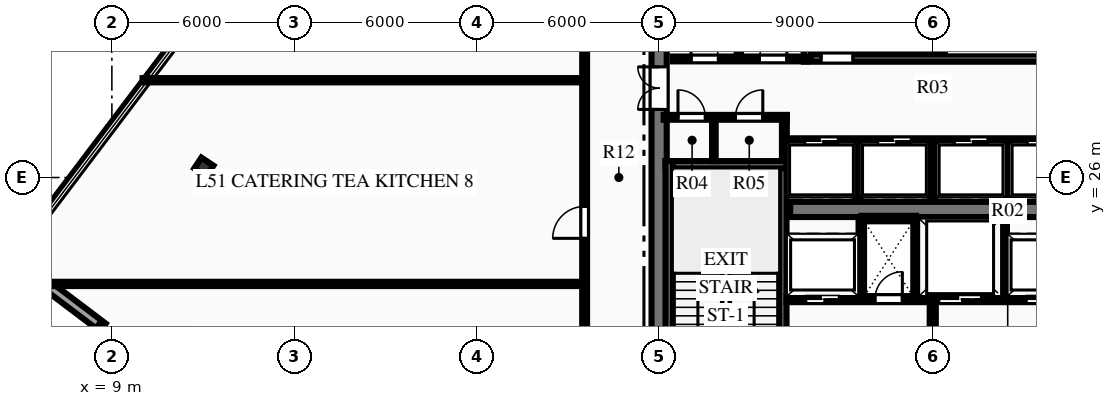
"""IFC4 building model, lengths in metres.
Left out: names, types, materials, properties, quantities, classifications, styles, units other than length and angle.
Written with IfcOpenShell. Run it as: python <this file> out.ifc"""

import sys

from ifc_helpers import new_model, si_unit, direction, frame, frame_2d, origin, origin_2d, place, context, subcontext, project, spatial, rectangle, i_section, extrude, element, fill, save


model = new_model("IFC4")
c1 = context("Model", 3, precision=1e-05, world=origin(), true_north=direction((0.0, 1.0)))
c2 = subcontext(c1, "Body", "Model", "MODEL_VIEW")
j1 = project(units=[si_unit("LENGTHUNIT", "METRE"), si_unit("PLANEANGLEUNIT", "RADIAN")], contexts=[c1])
p1 = place(None, origin())
s1 = spatial("IfcSite", under=j1, at=p1, CompositionType="ELEMENT")
p2 = place(p1, origin())
s2 = spatial("IfcBuilding", under=s1, at=p2, CompositionType="ELEMENT")
p3 = place(p2, frame((0.0, 0.0, 205.95)))
s3 = spatial("IfcBuildingStorey", under=s2, at=p3, CompositionType="ELEMENT", Elevation=205.95)
p4 = place(p3, frame((27.0, 18.25, 0.0), z_axis=(0.0, 0.0, 1.0), x_axis=(0.0, 1.0, 0.0)))
e1 = element("IfcWall", 1, at=p4, inside=s3, PredefinedType="SHEAR", context=c2, shape_type="SweptSolid", body=[
    extrude(rectangle(XDim=15.5, YDim=0.5, at=frame_2d((7.75, 0.0))), origin(), (0.0, 0.0, 1.0), 3.75),
])
p5 = place(p4, frame((9.99, 0.0, 0.0)))
e2 = element("IfcOpeningElement", 2, at=p5, cuts=e1, PredefinedType="OPENING", context=c2, shape_type="SweptSolid", body=[
    extrude(rectangle(XDim=1.4, YDim=2.2, at=frame_2d((0.7, 1.1))), frame((0.0, 0.26, 0.0), z_axis=(0.0, -1.0, 0.0), x_axis=(1.0, 0.0, 0.0)), (0.0, 0.0, 1.0), 0.52),
])
p6 = place(p3, frame((31.31, 24.95, 0.0), z_axis=(0.0, 0.0, 1.0), x_axis=(1.0, 0.0, 0.0)))
e3 = element("IfcWall", 3, at=p6, inside=s3, PredefinedType="SHEAR", context=c2, shape_type="SweptSolid", body=[
    extrude(rectangle(XDim=9.38, YDim=0.5, at=frame_2d((4.69, 0.0))), origin(), (0.0, 0.0, 1.0), 3.75),
])
p7 = place(p3, frame((31.07, 18.28, 0.0), z_axis=(0.0, 0.0, 1.0), x_axis=(0.0, 1.0, 0.0)))
e4 = element("IfcWall", 4, at=p7, inside=s3, PredefinedType="SHEAR", context=c2, shape_type="SweptSolid", body=[
    extrude(rectangle(XDim=8.26, YDim=0.24, at=frame_2d((4.13, 0.0))), origin(), (0.0, 0.0, 1.0), 3.75),
])
p8 = place(p7, frame((0.365, 0.0, 0.0)))
e5 = element("IfcOpeningElement", 5, at=p8, cuts=e4, PredefinedType="OPENING", context=c2, shape_type="SweptSolid", body=[
    extrude(rectangle(XDim=1.05, YDim=2.15, at=frame_2d((0.525, 1.075))), frame((0.0, 0.13, 0.0), z_axis=(0.0, -1.0, 0.0), x_axis=(1.0, 0.0, 0.0)), (0.0, 0.0, 1.0), 0.26),
])
p9 = place(p3, frame((27.21, 26.42, 0.0), z_axis=(0.0, 0.0, 1.0), x_axis=(1.0, 0.0, 0.0)))
e6 = element("IfcWall", 6, at=p9, inside=s3, PredefinedType="SHEAR", context=c2, shape_type="SweptSolid", body=[
    extrude(rectangle(XDim=3.98, YDim=0.24, at=frame_2d((1.99, 0.0))), origin(), (0.0, 0.0, 1.0), 3.75),
])
p10 = place(p3, frame((27.33, 18.28, 0.0), z_axis=(0.0, 0.0, 1.0), x_axis=(0.0, 1.0, 0.0)))
e7 = element("IfcWall", 7, at=p10, inside=s3, PredefinedType="SHEAR", context=c2, shape_type="SweptSolid", body=[
    extrude(rectangle(XDim=8.26, YDim=0.24, at=frame_2d((4.13, 0.0))), origin(), (0.0, 0.0, 1.0), 3.75),
])
p11 = place(p3, frame((31.76, 29.93, 0.0), z_axis=(0.0, 0.0, 1.0), x_axis=(1.0, 0.0, 0.0)))
e8 = element("IfcWall", 8, at=p11, inside=s3, PredefinedType="SHEAR", context=c2, shape_type="SweptSolid", body=[
    extrude(rectangle(XDim=8.38, YDim=0.24, at=frame_2d((4.19, 0.0))), origin(), (0.0, 0.0, 1.0), 3.75),
])
p12 = place(p11, frame((0.565, 0.0, 0.0)))
e9 = element("IfcOpeningElement", 9, at=p12, cuts=e8, PredefinedType="OPENING", context=c2, shape_type="SweptSolid", body=[
    extrude(rectangle(XDim=1.05, YDim=2.15, at=frame_2d((0.525, 1.075))), frame((0.0, 0.13, 0.0), z_axis=(0.0, -1.0, 0.0), x_axis=(1.0, 0.0, 0.0)), (0.0, 0.0, 1.0), 0.26),
])
p13 = place(p3, frame((31.88, 29.93, 0.0), z_axis=(0.0, 0.0, 1.0), x_axis=(0.0, 1.0, 0.0)))
e10 = element("IfcWall", 10, at=p13, inside=s3, PredefinedType="SHEAR", context=c2, shape_type="SweptSolid", body=[
    extrude(rectangle(XDim=3.79, YDim=0.24, at=frame_2d((1.895, 0.0))), origin(), (0.0, 0.0, 1.0), 3.75),
])
p14 = place(p3, frame((12.025, 26.347, 0.0), z_axis=(0.0, 0.0, 1.0), x_axis=(0.554118199338, 0.832437998389, 0.0)))
e11 = element("IfcColumn", 11, at=p14, inside=s3, PredefinedType="COLUMN", context=c2, shape_type="SweptSolid", body=[
    extrude(i_section(OverallWidth=0.424, OverallDepth=0.474, WebThickness=0.048, FlangeThickness=0.077, at=origin_2d()), origin(), (0.0, 0.0, 1.0), 3.75),
])
p15 = place(p3, frame((8.7, 21.07, 0.0), z_axis=(0.0, 0.0, 1.0), x_axis=(-0.797582200659, 0.603210272784, 0.0)))
e12 = element("IfcWall", 12, at=p15, inside=s3, PredefinedType="STANDARD", context=c2, shape_type="SweptSolid", body=[
    extrude(rectangle(XDim=3.9, YDim=0.32, at=frame_2d((1.95, 0.0))), origin(), (0.0, 0.0, 1.0), 3.47),
])
p16 = place(p3, frame((6.347, 17.959, 0.0), z_axis=(0.0, 0.0, 1.0), x_axis=(0.603210272784, 0.797582200659, 0.0)))
e13 = element("IfcWall", 13, at=p16, inside=s3, PredefinedType="STANDARD", context=c2, shape_type="SweptSolid", body=[
    extrude(rectangle(XDim=3.9, YDim=0.32, at=frame_2d((1.95, 0.0))), origin(), (0.0, 0.0, 1.0), 3.47),
])
p17 = place(p16, frame((1.25, 0.0, 0.85)))
e14 = element("IfcOpeningElement", 14, at=p17, cuts=e13, PredefinedType="OPENING", context=c2, shape_type="SweptSolid", body=[
    extrude(rectangle(XDim=1.4, YDim=2.0, at=frame_2d((0.7, 1.0))), frame((0.0, 0.17, 0.0), z_axis=(0.0, -1.0, 0.0), x_axis=(1.0, 0.0, 0.0)), (0.0, 0.0, 1.0), 0.34),
])
p18 = place(p3, frame((36.0, 18.28, 0.0), z_axis=(0.0, 0.0, 1.0), x_axis=(0.0, 1.0, 0.0)))
e15 = element("IfcWall", 15, at=p18, inside=s3, PredefinedType="PARTITIONING", context=c2, shape_type="SweptSolid", body=[
    extrude(rectangle(XDim=3.77, YDim=0.2, at=frame_2d((1.885, 0.0))), origin(), (0.0, 0.0, 1.0), 3.47),
])
p19 = place(p3, frame((31.19, 22.0, 0.0), z_axis=(0.0, 0.0, 1.0), x_axis=(1.0, 0.0, 0.0)))
e16 = element("IfcWall", 16, at=p19, inside=s3, PredefinedType="PARTITIONING", context=c2, shape_type="SweptSolid", body=[
    extrude(rectangle(XDim=4.69, YDim=0.2, at=frame_2d((2.345, 0.0))), origin(), (0.0, 0.0, 1.0), 3.47),
])
p20 = place(p19, frame((2.91, 0.0, 0.0)))
e17 = element("IfcOpeningElement", 17, at=p20, cuts=e16, PredefinedType="OPENING", context=c2, shape_type="SweptSolid", body=[
    extrude(rectangle(XDim=0.9, YDim=2.15, at=frame_2d((0.45, 1.075))), frame((0.0, 0.11, 0.0), z_axis=(0.0, -1.0, 0.0), x_axis=(1.0, 0.0, 0.0)), (0.0, 0.0, 1.0), 0.22),
])
p21 = place(p19, frame((0.635, 0.0, 0.0)))
e18 = element("IfcOpeningElement", 18, at=p21, cuts=e16, PredefinedType="OPENING", context=c2, shape_type="SweptSolid", body=[
    extrude(rectangle(XDim=1.1, YDim=2.15, at=frame_2d((0.55, 1.075))), frame((0.0, 0.11, 0.0), z_axis=(0.0, -1.0, 0.0), x_axis=(1.0, 0.0, 0.0)), (0.0, 0.0, 1.0), 0.22),
])
p22 = place(p3, frame((36.12, 22.0, 0.0), z_axis=(0.0, 0.0, 1.0), x_axis=(1.0, 0.0, 0.0)))
e19 = element("IfcWall", 19, at=p22, inside=s3, PredefinedType="PARTITIONING", context=c2, shape_type="SweptSolid", body=[
    extrude(rectangle(XDim=4.69, YDim=0.2, at=frame_2d((2.345, 0.0))), origin(), (0.0, 0.0, 1.0), 3.47),
])
p23 = place(p22, frame((2.955, 0.0, 0.0)))
e20 = element("IfcOpeningElement", 20, at=p23, cuts=e19, PredefinedType="OPENING", context=c2, shape_type="SweptSolid", body=[
    extrude(rectangle(XDim=1.1, YDim=2.15, at=frame_2d((0.55, 1.075))), frame((0.0, 0.11, 0.0), z_axis=(0.0, -1.0, 0.0), x_axis=(1.0, 0.0, 0.0)), (0.0, 0.0, 1.0), 0.22),
])
p24 = place(p22, frame((0.08, 0.0, 0.0)))
e21 = element("IfcOpeningElement", 21, at=p24, cuts=e19, PredefinedType="OPENING", context=c2, shape_type="SweptSolid", body=[
    extrude(rectangle(XDim=1.4, YDim=2.2, at=frame_2d((0.7, 1.1))), frame((0.0, 0.11, 0.0), z_axis=(0.0, -1.0, 0.0), x_axis=(1.0, 0.0, 0.0)), (0.0, 0.0, 1.0), 0.22),
])
for number, where, z_axis, x_axis in (
    (22, (33.65, 22.05, 0.0), (0.0, 0.0, 1.0), (0.0, 1.0, 0.0)),
    (23, (35.45, 22.05, 0.0), (0.0, 0.0, 1.0), (0.0, 1.0, 0.0)),
):
    element("IfcWall", number, at=place(p3, frame(where, z_axis=z_axis, x_axis=x_axis)), inside=s3, PredefinedType="PARTITIONING", context=c2, shape_type="SweptSolid", body=[
        extrude(rectangle(XDim=2.6, YDim=0.18, at=frame_2d((1.3, 0.0))), origin(), (0.0, 0.0, 1.0), 3.47),
    ])
p25 = place(p3, frame((33.65, 24.65, 0.0), z_axis=(0.0, 0.0, 1.0), x_axis=(1.0, 0.0, 0.0)))
e24 = element("IfcWall", 24, at=p25, inside=s3, PredefinedType="PARTITIONING", context=c2, shape_type="SweptSolid", body=[
    extrude(rectangle(XDim=1.8, YDim=0.18, at=frame_2d((0.9, 0.0))), origin(), (0.0, 0.0, 1.0), 3.47),
])
p26 = place(p3, frame((38.35, 22.05, 0.0), z_axis=(0.0, 0.0, 1.0), x_axis=(0.0, 1.0, 0.0)))
e25 = element("IfcWall", 25, at=p26, inside=s3, PredefinedType="PARTITIONING", context=c2, shape_type="SweptSolid", body=[
    extrude(rectangle(XDim=2.6, YDim=0.18, at=frame_2d((1.3, 0.0))), origin(), (0.0, 0.0, 1.0), 3.47),
])
p27 = place(p3, frame((27.15, 27.98, 0.0), z_axis=(0.0, 0.0, 1.0), x_axis=(1.0, 0.0, 0.0)))
e26 = element("IfcWall", 26, at=p27, inside=s3, PredefinedType="PARTITIONING", context=c2, shape_type="SweptSolid", body=[
    extrude(rectangle(XDim=4.05, YDim=0.16, at=frame_2d((2.025, 0.0))), origin(), (0.0, 0.0, 1.0), 3.47),
])
p28 = place(p27, frame((0.47, 0.0, 0.0)))
e27 = element("IfcOpeningElement", 27, at=p28, cuts=e26, PredefinedType="OPENING", context=c2, shape_type="SweptSolid", body=[
    extrude(rectangle(XDim=0.9, YDim=2.15, at=frame_2d((0.45, 1.075))), frame((0.0, 0.09, 0.0), z_axis=(0.0, -1.0, 0.0), x_axis=(1.0, 0.0, 0.0)), (0.0, 0.0, 1.0), 0.18),
])
p29 = place(p27, frame((2.36, 0.0, 0.0)))
e28 = element("IfcOpeningElement", 28, at=p29, cuts=e26, PredefinedType="OPENING", context=c2, shape_type="SweptSolid", body=[
    extrude(rectangle(XDim=0.9, YDim=2.15, at=frame_2d((0.45, 1.075))), frame((0.0, 0.09, 0.0), z_axis=(0.0, -1.0, 0.0), x_axis=(1.0, 0.0, 0.0)), (0.0, 0.0, 1.0), 0.18),
])
p30 = place(p3, frame((31.12, 26.54, 0.0), z_axis=(0.0, 0.0, 1.0), x_axis=(0.0, 1.0, 0.0)))
e29 = element("IfcWall", 29, at=p30, inside=s3, PredefinedType="PARTITIONING", context=c2, shape_type="SweptSolid", body=[
    extrude(rectangle(XDim=1.51, YDim=0.16, at=frame_2d((0.755, 0.0))), origin(), (0.0, 0.0, 1.0), 3.47),
])
p31 = place(p3, frame((28.8, 26.54, 0.0), z_axis=(0.0, 0.0, 1.0), x_axis=(0.0, 1.0, 0.0)))
e30 = element("IfcWall", 30, at=p31, inside=s3, PredefinedType="PARTITIONING", context=c2, shape_type="SweptSolid", body=[
    extrude(rectangle(XDim=1.44, YDim=0.12, at=frame_2d((0.72, 0.0))), origin(), (0.0, 0.0, 1.0), 3.47),
])
p32 = place(p3, frame((27.45, 29.9, 0.0), z_axis=(0.0, 0.0, 1.0), x_axis=(1.0, 0.0, 0.0)))
e31 = element("IfcWall", 31, at=p32, inside=s3, PredefinedType="PARTITIONING", context=c2, shape_type="SweptSolid", body=[
    extrude(rectangle(XDim=4.43, YDim=0.16, at=frame_2d((2.215, 0.0))), origin(), (0.0, 0.0, 1.0), 3.47),
])
p33 = place(p32, frame((0.6, 0.0, 0.0)))
e32 = element("IfcOpeningElement", 32, at=p33, cuts=e31, PredefinedType="OPENING", context=c2, shape_type="SweptSolid", body=[
    extrude(rectangle(XDim=0.9, YDim=2.15, at=frame_2d((0.45, 1.075))), frame((0.0, 0.09, 0.0), z_axis=(0.0, -1.0, 0.0), x_axis=(1.0, 0.0, 0.0)), (0.0, 0.0, 1.0), 0.18),
])
p34 = place(p32, frame((2.85, 0.0, 0.0)))
e33 = element("IfcOpeningElement", 33, at=p34, cuts=e31, PredefinedType="OPENING", context=c2, shape_type="SweptSolid", body=[
    extrude(rectangle(XDim=0.9, YDim=2.15, at=frame_2d((0.45, 1.075))), frame((0.0, 0.09, 0.0), z_axis=(0.0, -1.0, 0.0), x_axis=(1.0, 0.0, 0.0)), (0.0, 0.0, 1.0), 0.18),
])
p35 = place(p3, frame((29.62, 29.95, 0.0), z_axis=(0.0, 0.0, 1.0), x_axis=(0.0, 1.0, 0.0)))
e34 = element("IfcWall", 34, at=p35, inside=s3, PredefinedType="PARTITIONING", context=c2, shape_type="SweptSolid", body=[
    extrude(rectangle(XDim=3.6, YDim=0.14, at=frame_2d((1.8, 0.0))), origin(), (0.0, 0.0, 1.0), 3.47),
])
p36 = place(p3, frame((31.2, 27.2, 0.0), z_axis=(0.0, 0.0, 1.0), x_axis=(1.0, 0.0, 0.0)))
e35 = element("IfcWall", 35, at=p36, inside=s3, PredefinedType="PARTITIONING", context=c2, shape_type="SweptSolid", body=[
    extrude(rectangle(XDim=9.6, YDim=0.18, at=frame_2d((4.8, 0.0))), origin(), (0.0, 0.0, 1.0), 3.47),
])
p37 = place(p36, frame((0.59, 0.0, 0.0)))
e36 = element("IfcOpeningElement", 36, at=p37, cuts=e35, PredefinedType="OPENING", context=c2, shape_type="SweptSolid", body=[
    extrude(rectangle(XDim=1.1, YDim=2.15, at=frame_2d((0.55, 1.075))), frame((0.0, 0.1, 0.0), z_axis=(0.0, -1.0, 0.0), x_axis=(1.0, 0.0, 0.0)), (0.0, 0.0, 1.0), 0.2),
])
p38 = place(p36, frame((2.99, 0.0, 0.0)))
e37 = element("IfcOpeningElement", 37, at=p38, cuts=e35, PredefinedType="OPENING", context=c2, shape_type="SweptSolid", body=[
    extrude(rectangle(XDim=1.1, YDim=2.15, at=frame_2d((0.55, 1.075))), frame((0.0, 0.1, 0.0), z_axis=(0.0, -1.0, 0.0), x_axis=(1.0, 0.0, 0.0)), (0.0, 0.0, 1.0), 0.2),
])
p39 = place(p36, frame((5.51, 0.0, 0.0)))
e38 = element("IfcOpeningElement", 38, at=p39, cuts=e35, PredefinedType="OPENING", context=c2, shape_type="SweptSolid", body=[
    extrude(rectangle(XDim=1.1, YDim=2.15, at=frame_2d((0.55, 1.075))), frame((0.0, 0.1, 0.0), z_axis=(0.0, -1.0, 0.0), x_axis=(1.0, 0.0, 0.0)), (0.0, 0.0, 1.0), 0.2),
])
p40 = place(p36, frame((7.91, 0.0, 0.0)))
e39 = element("IfcOpeningElement", 39, at=p40, cuts=e35, PredefinedType="OPENING", context=c2, shape_type="SweptSolid", body=[
    extrude(rectangle(XDim=1.1, YDim=2.15, at=frame_2d((0.55, 1.075))), frame((0.0, 0.1, 0.0), z_axis=(0.0, -1.0, 0.0), x_axis=(1.0, 0.0, 0.0)), (0.0, 0.0, 1.0), 0.2),
])
for number, where, z_axis, x_axis in (
    (40, (33.54, 25.3, 0.0), (0.0, 0.0, 1.0), (0.0, 1.0, 0.0)),
    (41, (36.0, 25.3, 0.0), (0.0, 0.0, 1.0), (0.0, 1.0, 0.0)),
    (42, (38.46, 25.3, 0.0), (0.0, 0.0, 1.0), (0.0, 1.0, 0.0)),
):
    element("IfcWall", number, at=place(p3, frame(where, z_axis=z_axis, x_axis=x_axis)), inside=s3, PredefinedType="PARTITIONING", context=c2, shape_type="SweptSolid", body=[
        extrude(rectangle(XDim=1.9, YDim=0.18, at=frame_2d((0.95, 0.0))), origin(), (0.0, 0.0, 1.0), 3.47),
    ])
p41 = place(p3, frame((24.55, 17.85, 0.0), z_axis=(0.0, 0.0, 1.0), x_axis=(0.0, 1.0, 0.0)))
e43 = element("IfcWall", 43, at=p41, inside=s3, PredefinedType="PARTITIONING", context=c2, shape_type="SweptSolid", body=[
    extrude(rectangle(XDim=16.3, YDim=0.16, at=frame_2d((8.15, 0.0))), origin(), (0.0, 0.0, 1.0), 3.47),
])
p42 = place(p41, frame((6.149, 0.0, 0.0)))
e44 = element("IfcOpeningElement", 44, at=p42, cuts=e43, PredefinedType="OPENING", context=c2, shape_type="SweptSolid", body=[
    extrude(rectangle(XDim=1.05, YDim=2.15, at=frame_2d((0.525, 1.075))), frame((0.0, 0.09, 0.0), z_axis=(0.0, -1.0, 0.0), x_axis=(1.0, 0.0, 0.0)), (0.0, 0.0, 1.0), 0.18),
])
p43 = place(p3, frame((6.875, 22.5, 0.0), z_axis=(0.0, 0.0, 1.0), x_axis=(1.0, 0.0, 0.0)))
e45 = element("IfcWall", 45, at=p43, inside=s3, PredefinedType="PARTITIONING", context=c2, shape_type="SweptSolid", body=[
    extrude(rectangle(XDim=17.675, YDim=0.14, at=frame_2d((8.837, 0.0))), origin(), (0.0, 0.0, 1.0), 3.47),
])
p44 = place(p3, frame((10.009, 29.2, 0.0), z_axis=(0.0, 0.0, 1.0), x_axis=(1.0, 0.0, 0.0)))
e46 = element("IfcWall", 46, at=p44, inside=s3, PredefinedType="PARTITIONING", context=c2, shape_type="SweptSolid", body=[
    extrude(rectangle(XDim=14.541, YDim=0.14, at=frame_2d((7.271, 0.0))), origin(), (0.0, 0.0, 1.0), 3.47),
])
p45 = place(p28, origin())
e47 = element("IfcDoor", 47, at=p45, inside=s3, OperationType="SINGLE_SWING_LEFT", PredefinedType="DOOR", context=c2, shape_type="SweptSolid", body=[
    extrude(rectangle(XDim=0.9, YDim=2.15, at=frame_2d((0.45, 1.075))), frame((0.0, 0.025, 0.0), z_axis=(0.0, -1.0, 0.0), x_axis=(1.0, 0.0, 0.0)), (0.0, 0.0, 1.0), 0.05),
])
fill(e27, e47)
p46 = place(p29, origin())
e48 = element("IfcDoor", 48, at=p46, inside=s3, OperationType="SINGLE_SWING_RIGHT", PredefinedType="DOOR", context=c2, shape_type="SweptSolid", body=[
    extrude(rectangle(XDim=0.9, YDim=2.15, at=frame_2d((0.45, 1.075))), frame((0.0, 0.025, 0.0), z_axis=(0.0, -1.0, 0.0), x_axis=(1.0, 0.0, 0.0)), (0.0, 0.0, 1.0), 0.05),
])
fill(e28, e48)
p47 = place(p33, origin())
e49 = element("IfcDoor", 49, at=p47, inside=s3, OperationType="SINGLE_SWING_LEFT", PredefinedType="DOOR", context=c2, shape_type="SweptSolid", body=[
    extrude(rectangle(XDim=0.9, YDim=2.15, at=frame_2d((0.45, 1.075))), frame((0.0, 0.025, 0.0), z_axis=(0.0, -1.0, 0.0), x_axis=(1.0, 0.0, 0.0)), (0.0, 0.0, 1.0), 0.05),
])
fill(e32, e49)
p48 = place(p34, origin())
e50 = element("IfcDoor", 50, at=p48, inside=s3, OperationType="SINGLE_SWING_RIGHT", PredefinedType="DOOR", context=c2, shape_type="SweptSolid", body=[
    extrude(rectangle(XDim=0.9, YDim=2.15, at=frame_2d((0.45, 1.075))), frame((0.0, 0.025, 0.0), z_axis=(0.0, -1.0, 0.0), x_axis=(1.0, 0.0, 0.0)), (0.0, 0.0, 1.0), 0.05),
])
fill(e33, e50)
p49 = place(p12, origin())
e51 = element("IfcDoor", 51, at=p49, inside=s3, OperationType="SINGLE_SWING_LEFT", PredefinedType="DOOR", context=c2, shape_type="SweptSolid", body=[
    extrude(rectangle(XDim=1.05, YDim=2.15, at=frame_2d((0.525, 1.075))), frame((0.0, 0.025, 0.0), z_axis=(0.0, -1.0, 0.0), x_axis=(1.0, 0.0, 0.0)), (0.0, 0.0, 1.0), 0.05),
])
fill(e9, e51)
p50 = place(p20, origin())
e52 = element("IfcDoor", 52, at=p50, inside=s3, OperationType="SINGLE_SWING_RIGHT", PredefinedType="DOOR", context=c2, shape_type="SweptSolid", body=[
    extrude(rectangle(XDim=0.9, YDim=2.15, at=frame_2d((0.45, 1.075))), frame((0.0, 0.025, 0.0), z_axis=(0.0, -1.0, 0.0), x_axis=(1.0, 0.0, 0.0)), (0.0, 0.0, 1.0), 0.05),
])
fill(e17, e52)
p51 = place(p5, origin())
e53 = element("IfcDoor", 53, at=p51, inside=s3, OperationType="DOUBLE_DOOR_SINGLE_SWING", PredefinedType="DOOR", context=c2, shape_type="SweptSolid", body=[
    extrude(rectangle(XDim=1.4, YDim=2.2, at=frame_2d((0.7, 1.1))), frame((0.0, 0.025, 0.0), z_axis=(0.0, -1.0, 0.0), x_axis=(1.0, 0.0, 0.0)), (0.0, 0.0, 1.0), 0.05),
])
fill(e2, e53)
p52 = place(p42, origin())
e54 = element("IfcDoor", 54, at=p52, inside=s3, OperationType="SINGLE_SWING_LEFT", PredefinedType="DOOR", context=c2, shape_type="SweptSolid", body=[
    extrude(rectangle(XDim=1.05, YDim=2.15, at=frame_2d((0.525, 1.075))), frame((0.0, 0.025, 0.0), z_axis=(0.0, -1.0, 0.0), x_axis=(1.0, 0.0, 0.0)), (0.0, 0.0, 1.0), 0.05),
])
fill(e44, e54)
p53 = place(p37, origin())
e55 = element("IfcDoor", 55, at=p53, inside=s3, OperationType="SLIDING_TO_LEFT", PredefinedType="DOOR", context=c2, shape_type="SweptSolid", body=[
    extrude(rectangle(XDim=1.1, YDim=2.15, at=frame_2d((0.55, 1.075))), frame((0.0, 0.025, 0.0), z_axis=(0.0, -1.0, 0.0), x_axis=(1.0, 0.0, 0.0)), (0.0, 0.0, 1.0), 0.05),
])
fill(e36, e55)
p54 = place(p38, origin())
e56 = element("IfcDoor", 56, at=p54, inside=s3, OperationType="SLIDING_TO_LEFT", PredefinedType="DOOR", context=c2, shape_type="SweptSolid", body=[
    extrude(rectangle(XDim=1.1, YDim=2.15, at=frame_2d((0.55, 1.075))), frame((0.0, 0.025, 0.0), z_axis=(0.0, -1.0, 0.0), x_axis=(1.0, 0.0, 0.0)), (0.0, 0.0, 1.0), 0.05),
])
fill(e37, e56)
p55 = place(p39, origin())
e57 = element("IfcDoor", 57, at=p55, inside=s3, OperationType="SLIDING_TO_LEFT", PredefinedType="DOOR", context=c2, shape_type="SweptSolid", body=[
    extrude(rectangle(XDim=1.1, YDim=2.15, at=frame_2d((0.55, 1.075))), frame((0.0, 0.025, 0.0), z_axis=(0.0, -1.0, 0.0), x_axis=(1.0, 0.0, 0.0)), (0.0, 0.0, 1.0), 0.05),
])
fill(e38, e57)
p56 = place(p40, origin())
e58 = element("IfcDoor", 58, at=p56, inside=s3, OperationType="SLIDING_TO_LEFT", PredefinedType="DOOR", context=c2, shape_type="SweptSolid", body=[
    extrude(rectangle(XDim=1.1, YDim=2.15, at=frame_2d((0.55, 1.075))), frame((0.0, 0.025, 0.0), z_axis=(0.0, -1.0, 0.0), x_axis=(1.0, 0.0, 0.0)), (0.0, 0.0, 1.0), 0.05),
])
fill(e39, e58)
p57 = place(p21, origin())
e59 = element("IfcDoor", 59, at=p57, inside=s3, OperationType="SLIDING_TO_LEFT", PredefinedType="DOOR", context=c2, shape_type="SweptSolid", body=[
    extrude(rectangle(XDim=1.1, YDim=2.15, at=frame_2d((0.55, 1.075))), frame((0.0, 0.025, 0.0), z_axis=(0.0, -1.0, 0.0), x_axis=(1.0, 0.0, 0.0)), (0.0, 0.0, 1.0), 0.05),
])
fill(e18, e59)
p58 = place(p23, origin())
e60 = element("IfcDoor", 60, at=p58, inside=s3, OperationType="SLIDING_TO_LEFT", PredefinedType="DOOR", context=c2, shape_type="SweptSolid", body=[
    extrude(rectangle(XDim=1.1, YDim=2.15, at=frame_2d((0.55, 1.075))), frame((0.0, 0.025, 0.0), z_axis=(0.0, -1.0, 0.0), x_axis=(1.0, 0.0, 0.0)), (0.0, 0.0, 1.0), 0.05),
])
fill(e20, e60)
p59 = place(p24, origin())
e61 = element("IfcDoor", 61, at=p59, inside=s3, OperationType="SLIDING_TO_LEFT", PredefinedType="DOOR", context=c2, shape_type="SweptSolid", body=[
    extrude(rectangle(XDim=1.4, YDim=2.2, at=frame_2d((0.7, 1.1))), frame((0.0, 0.025, 0.0), z_axis=(0.0, -1.0, 0.0), x_axis=(1.0, 0.0, 0.0)), (0.0, 0.0, 1.0), 0.05),
])
fill(e21, e61)
save(model, sys.argv[1])
